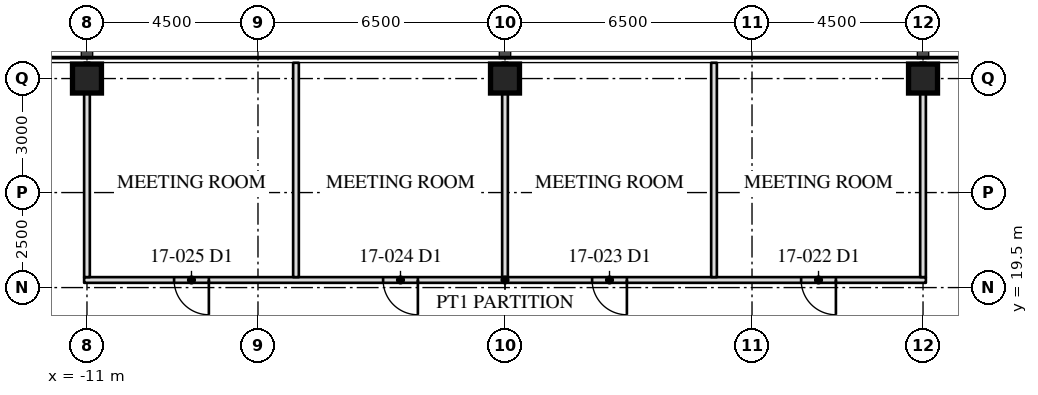
"""IFC4 building model, lengths in metres.
Left out: names, types, materials, properties, quantities, classifications, styles, units other than length and angle.
Written with IfcOpenShell. Run it as: python <this file> out.ifc"""

import sys

from ifc_helpers import new_model, si_unit, direction, frame, frame_2d, origin, origin_2d, place, context, subcontext, project, spatial, rectangle, hollow_rectangle, extrude, element, fill, save


model = new_model("IFC4")
c1 = context("Model", 3, precision=1e-05, world=origin(), true_north=direction((0.0, 1.0)))
c2 = subcontext(c1, "Body", "Model", "MODEL_VIEW")
j1 = project(units=[si_unit("LENGTHUNIT", "METRE"), si_unit("PLANEANGLEUNIT", "RADIAN")], contexts=[c1])
p1 = place(None, origin())
s1 = spatial("IfcSite", under=j1, at=p1, CompositionType="ELEMENT")
p2 = place(p1, origin())
s2 = spatial("IfcBuilding", under=s1, at=p2, CompositionType="ELEMENT")
p3 = place(p2, frame((0.0, 0.0, 73.4)))
s3 = spatial("IfcBuildingStorey", under=s2, at=p3, CompositionType="ELEMENT", Elevation=73.4)
for number, where, z_axis, x_axis in (
    (1, (11.0, 25.0, 0.0), (0.0, 0.0, 1.0), (1.0, 0.0, 0.0)),
    (2, (0.0, 25.0, 0.0), (0.0, 0.0, 1.0), (1.0, 0.0, 0.0)),
    (3, (-11.0, 25.0, 0.0), (0.0, 0.0, 1.0), (1.0, 0.0, 0.0)),
):
    element("IfcColumn", number, at=place(p3, frame(where, z_axis=z_axis, x_axis=x_axis)), inside=s3, PredefinedType="COLUMN", context=c2, shape_type="SweptSolid", body=[
        extrude(hollow_rectangle(XDim=0.762, YDim=0.762, WallThickness=0.127, at=origin_2d()), origin(), (0.0, 0.0, 1.0), 4.1),
    ])
p4 = place(p3, frame((11.075, 19.7, 0.0), z_axis=(0.0, 0.0, 1.0), x_axis=(-1.0, 0.0, 0.0)))
e4 = element("IfcWall", 4, at=p4, inside=s3, PredefinedType="PARTITIONING", context=c2, shape_type="SweptSolid", body=[
    extrude(rectangle(XDim=22.15, YDim=0.15, at=frame_2d((11.075, 0.0))), origin(), (0.0, 0.0, 1.0), 3.91),
])
p5 = place(p4, frame((2.367, 0.0, 0.0)))
e5 = element("IfcOpeningElement", 5, at=p5, cuts=e4, PredefinedType="OPENING", context=c2, shape_type="SweptSolid", body=[
    extrude(rectangle(XDim=0.915, YDim=2.134, at=frame_2d((0.458, 1.067))), frame((0.0, 0.085, 0.0), z_axis=(0.0, -1.0, 0.0), x_axis=(1.0, 0.0, 0.0)), (0.0, 0.0, 1.0), 0.17),
])
p6 = place(p4, frame((7.867, 0.0, 0.0)))
e6 = element("IfcOpeningElement", 6, at=p6, cuts=e4, PredefinedType="OPENING", context=c2, shape_type="SweptSolid", body=[
    extrude(rectangle(XDim=0.915, YDim=2.134, at=frame_2d((0.458, 1.067))), frame((0.0, 0.085, 0.0), z_axis=(0.0, -1.0, 0.0), x_axis=(1.0, 0.0, 0.0)), (0.0, 0.0, 1.0), 0.17),
])
p7 = place(p4, frame((13.367, 0.0, 0.0)))
e7 = element("IfcOpeningElement", 7, at=p7, cuts=e4, PredefinedType="OPENING", context=c2, shape_type="SweptSolid", body=[
    extrude(rectangle(XDim=0.915, YDim=2.134, at=frame_2d((0.458, 1.067))), frame((0.0, 0.085, 0.0), z_axis=(0.0, -1.0, 0.0), x_axis=(1.0, 0.0, 0.0)), (0.0, 0.0, 1.0), 0.17),
])
p8 = place(p4, frame((18.867, 0.0, 0.0)))
e8 = element("IfcOpeningElement", 8, at=p8, cuts=e4, PredefinedType="OPENING", context=c2, shape_type="SweptSolid", body=[
    extrude(rectangle(XDim=0.915, YDim=2.134, at=frame_2d((0.458, 1.067))), frame((0.0, 0.085, 0.0), z_axis=(0.0, -1.0, 0.0), x_axis=(1.0, 0.0, 0.0)), (0.0, 0.0, 1.0), 0.17),
])
p9 = place(p3, frame((11.0, 19.775, 0.0), z_axis=(0.0, 0.0, 1.0), x_axis=(0.0, 1.0, 0.0)))
e9 = element("IfcWall", 9, at=p9, inside=s3, PredefinedType="PARTITIONING", context=c2, shape_type="SweptSolid", body=[
    extrude(rectangle(XDim=5.64, YDim=0.15, at=frame_2d((2.82, 0.0))), origin(), (0.0, 0.0, 1.0), 3.13),
])
p10 = place(p3, frame((5.5, 19.775, 0.0), z_axis=(0.0, 0.0, 1.0), x_axis=(0.0, 1.0, 0.0)))
e10 = element("IfcWall", 10, at=p10, inside=s3, PredefinedType="PARTITIONING", context=c2, shape_type="SweptSolid", body=[
    extrude(rectangle(XDim=5.64, YDim=0.15, at=frame_2d((2.82, 0.0))), origin(), (0.0, 0.0, 1.0), 3.91),
])
p11 = place(p3, frame((0.0, 19.775, 0.0), z_axis=(0.0, 0.0, 1.0), x_axis=(0.0, 1.0, 0.0)))
e11 = element("IfcWall", 11, at=p11, inside=s3, PredefinedType="PARTITIONING", context=c2, shape_type="SweptSolid", body=[
    extrude(rectangle(XDim=5.64, YDim=0.15, at=frame_2d((2.82, 0.0))), origin(), (0.0, 0.0, 1.0), 3.13),
])
p12 = place(p3, frame((-5.5, 19.775, 0.0), z_axis=(0.0, 0.0, 1.0), x_axis=(0.0, 1.0, 0.0)))
e12 = element("IfcWall", 12, at=p12, inside=s3, PredefinedType="PARTITIONING", context=c2, shape_type="SweptSolid", body=[
    extrude(rectangle(XDim=5.64, YDim=0.15, at=frame_2d((2.82, 0.0))), origin(), (0.0, 0.0, 1.0), 3.91),
])
p13 = place(p3, frame((-11.0, 19.775, 0.0), z_axis=(0.0, 0.0, 1.0), x_axis=(0.0, 1.0, 0.0)))
e13 = element("IfcWall", 13, at=p13, inside=s3, PredefinedType="PARTITIONING", context=c2, shape_type="SweptSolid", body=[
    extrude(rectangle(XDim=5.64, YDim=0.15, at=frame_2d((2.82, 0.0))), origin(), (0.0, 0.0, 1.0), 3.13),
])
p14 = place(p5, origin())
e14 = element("IfcDoor", 14, at=p14, inside=s3, OperationType="SINGLE_SWING_LEFT", PredefinedType="DOOR", context=c2, shape_type="SweptSolid", body=[
    extrude(rectangle(XDim=0.915, YDim=2.134, at=frame_2d((0.458, 1.067))), frame((0.0, 0.025, 0.0), z_axis=(0.0, -1.0, 0.0), x_axis=(1.0, 0.0, 0.0)), (0.0, 0.0, 1.0), 0.05),
])
fill(e5, e14)
p15 = place(p6, origin())
e15 = element("IfcDoor", 15, at=p15, inside=s3, OperationType="SINGLE_SWING_LEFT", PredefinedType="DOOR", context=c2, shape_type="SweptSolid", body=[
    extrude(rectangle(XDim=0.915, YDim=2.134, at=frame_2d((0.458, 1.067))), frame((0.0, 0.025, 0.0), z_axis=(0.0, -1.0, 0.0), x_axis=(1.0, 0.0, 0.0)), (0.0, 0.0, 1.0), 0.05),
])
fill(e6, e15)
p16 = place(p7, origin())
e16 = element("IfcDoor", 16, at=p16, inside=s3, OperationType="SINGLE_SWING_LEFT", PredefinedType="DOOR", context=c2, shape_type="SweptSolid", body=[
    extrude(rectangle(XDim=0.915, YDim=2.134, at=frame_2d((0.458, 1.067))), frame((0.0, 0.025, 0.0), z_axis=(0.0, -1.0, 0.0), x_axis=(1.0, 0.0, 0.0)), (0.0, 0.0, 1.0), 0.05),
])
fill(e7, e16)
p17 = place(p8, origin())
e17 = element("IfcDoor", 17, at=p17, inside=s3, OperationType="SINGLE_SWING_LEFT", PredefinedType="DOOR", context=c2, shape_type="SweptSolid", body=[
    extrude(rectangle(XDim=0.915, YDim=2.134, at=frame_2d((0.458, 1.067))), frame((0.0, 0.025, 0.0), z_axis=(0.0, -1.0, 0.0), x_axis=(1.0, 0.0, 0.0)), (0.0, 0.0, 1.0), 0.05),
])
fill(e8, e17)
save(model, sys.argv[1])
